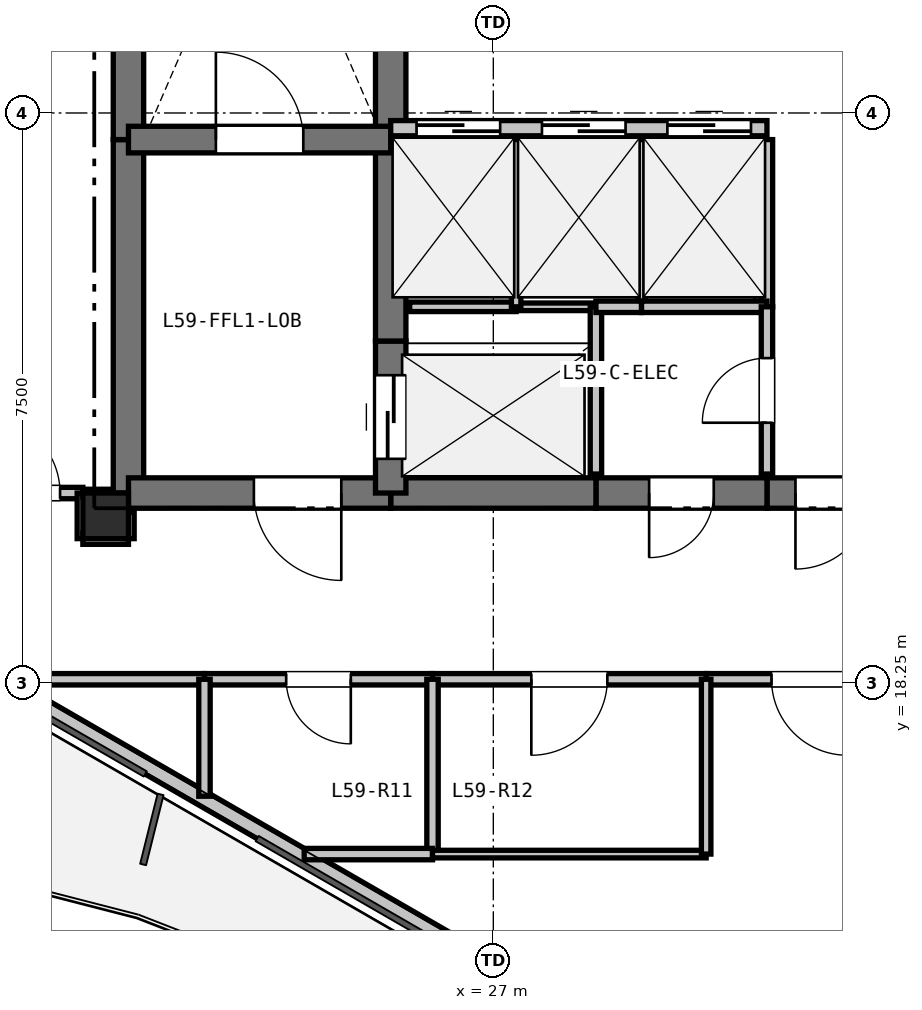
"""IFC4 building model, lengths in metres.
Left out: names, types, materials, properties, quantities, classifications, styles, units other than length and angle.
Written with IfcOpenShell. Run it as: python <this file> out.ifc"""

import sys

from ifc_helpers import new_model, si_unit, direction, frame, frame_2d, origin, origin_2d, place, context, subcontext, project, spatial, rectangle, extrude, element, fill, save


model = new_model("IFC4")
c1 = context("Model", 3, precision=1e-05, world=origin(), true_north=direction((0.0, 1.0)))
c2 = subcontext(c1, "Body", "Model", "MODEL_VIEW")
j1 = project(units=[si_unit("LENGTHUNIT", "METRE"), si_unit("PLANEANGLEUNIT", "RADIAN")], contexts=[c1])
p1 = place(None, origin())
s1 = spatial("IfcSite", under=j1, at=p1, CompositionType="ELEMENT")
p2 = place(p1, origin())
s2 = spatial("IfcBuilding", under=s1, at=p2, CompositionType="ELEMENT")
p3 = place(p2, frame((0.0, 0.0, 211.8)))
s3 = spatial("IfcBuildingStorey", under=s2, at=p3, CompositionType="ELEMENT", Elevation=211.8)
p4 = place(p3, frame((21.9, 20.45, 0.0), z_axis=(0.0, 0.0, 1.0), x_axis=(1.0, 0.0, 0.0)))
e1 = element("IfcColumn", 1, at=p4, inside=s3, PredefinedType="COLUMN", context=c2, shape_type="SweptSolid", body=[
    extrude(rectangle(XDim=0.6, YDim=0.6, at=origin_2d()), origin(), (0.0, 0.0, 1.0), 3.3),
])
p5 = place(p3, frame((27.102, 14.464, 0.0), z_axis=(0.0, 0.0, 1.0), x_axis=(-0.866020680503, 0.500008180874, 0.0)))
e2 = element("IfcWall", 2, at=p5, inside=s3, PredefinedType="PARAPET", context=c2, shape_type="SweptSolid", body=[
    extrude(rectangle(XDim=8.999, YDim=0.2, at=frame_2d((4.5, 0.0))), origin(), (0.0, 0.0, 1.0), 0.2),
])
p6 = place(p3, frame((22.2, 20.75, 0.0), z_axis=(0.0, 0.0, 1.0), x_axis=(0.0, 1.0, 0.0)))
e3 = element("IfcWall", 3, at=p6, inside=s3, PredefinedType="SHEAR", context=c2, shape_type="SweptSolid", body=[
    extrude(rectangle(XDim=4.65, YDim=0.4, at=frame_2d((2.325, 0.0))), origin(), (0.0, 0.0, 1.0), 3.07),
])
p7 = place(p3, frame((22.2, 25.4, 0.0), z_axis=(0.0, 0.0, 1.0), x_axis=(0.0, 1.0, 0.0)))
e4 = element("IfcWall", 4, at=p7, inside=s3, PredefinedType="SHEAR", context=c2, shape_type="SweptSolid", body=[
    extrude(rectangle(XDim=7.35, YDim=0.4, at=frame_2d((3.675, 0.0))), origin(), (0.0, 0.0, 1.0), 3.07),
])
p8 = place(p3, frame((32.35, 20.75, 0.0), z_axis=(0.0, 0.0, 1.0), x_axis=(-1.0, 0.0, 0.0)))
e5 = element("IfcWall", 5, at=p8, inside=s3, PredefinedType="SHEAR", context=c2, shape_type="SweptSolid", body=[
    extrude(rectangle(XDim=1.75, YDim=0.4, at=frame_2d((0.875, 0.0))), origin(), (0.0, 0.0, 1.0), 3.07),
])
p9 = place(p8, frame((0.375, 0.0, 0.0)))
e6 = element("IfcOpeningElement", 6, at=p9, cuts=e5, PredefinedType="OPENING", context=c2, shape_type="SweptSolid", body=[
    extrude(rectangle(XDim=1.0, YDim=2.15, at=frame_2d((0.5, 1.075))), frame((0.0, 0.21, 0.0), z_axis=(0.0, -1.0, 0.0), x_axis=(1.0, 0.0, 0.0)), (0.0, 0.0, 1.0), 0.42),
])
p10 = place(p3, frame((30.6, 20.75, 0.0), z_axis=(0.0, 0.0, 1.0), x_axis=(-1.0, 0.0, 0.0)))
e7 = element("IfcWall", 7, at=p10, inside=s3, PredefinedType="SHEAR", context=c2, shape_type="SweptSolid", body=[
    extrude(rectangle(XDim=2.25, YDim=0.4, at=frame_2d((1.125, 0.0))), origin(), (0.0, 0.0, 1.0), 3.07),
])
p11 = place(p10, frame((0.7, 0.0, 0.0)))
e8 = element("IfcOpeningElement", 8, at=p11, cuts=e7, PredefinedType="OPENING", context=c2, shape_type="SweptSolid", body=[
    extrude(rectangle(XDim=0.85, YDim=2.1, at=frame_2d((0.425, 1.05))), frame((0.0, 0.21, 0.0), z_axis=(0.0, -1.0, 0.0), x_axis=(1.0, 0.0, 0.0)), (0.0, 0.0, 1.0), 0.42),
])
p12 = place(p3, frame((28.35, 20.75, 0.0), z_axis=(0.0, 0.0, 1.0), x_axis=(-1.0, 0.0, 0.0)))
e9 = element("IfcWall", 9, at=p12, inside=s3, PredefinedType="SHEAR", context=c2, shape_type="SweptSolid", body=[
    extrude(rectangle(XDim=2.7, YDim=0.4, at=frame_2d((1.35, 0.0))), origin(), (0.0, 0.0, 1.0), 3.07),
])
p13 = place(p3, frame((25.65, 20.75, 0.0), z_axis=(0.0, 0.0, 1.0), x_axis=(-1.0, 0.0, 0.0)))
e10 = element("IfcWall", 10, at=p13, inside=s3, PredefinedType="SHEAR", context=c2, shape_type="SweptSolid", body=[
    extrude(rectangle(XDim=3.45, YDim=0.4, at=frame_2d((1.725, 0.0))), origin(), (0.0, 0.0, 1.0), 3.07),
])
p14 = place(p13, frame((0.65, 0.0, 0.0)))
e11 = element("IfcOpeningElement", 11, at=p14, cuts=e10, PredefinedType="OPENING", context=c2, shape_type="SweptSolid", body=[
    extrude(rectangle(XDim=1.15, YDim=2.15, at=frame_2d((0.575, 1.075))), frame((0.0, 0.21, 0.0), z_axis=(0.0, -1.0, 0.0), x_axis=(1.0, 0.0, 0.0)), (0.0, 0.0, 1.0), 0.42),
])
p15 = place(p3, frame((25.65, 20.75, 0.0), z_axis=(0.0, 0.0, 1.0), x_axis=(0.0, 1.0, 0.0)))
e12 = element("IfcWall", 12, at=p15, inside=s3, PredefinedType="SHEAR", context=c2, shape_type="SweptSolid", body=[
    extrude(rectangle(XDim=2.0, YDim=0.4, at=frame_2d((1.0, 0.0))), origin(), (0.0, 0.0, 1.0), 3.07),
])
p16 = place(p15, frame((0.45, 0.0, 0.0)))
e13 = element("IfcOpeningElement", 13, at=p16, cuts=e12, PredefinedType="OPENING", context=c2, shape_type="SweptSolid", body=[
    extrude(rectangle(XDim=1.1, YDim=2.15, at=frame_2d((0.55, 1.075))), frame((0.0, 0.21, 0.0), z_axis=(0.0, -1.0, 0.0), x_axis=(1.0, 0.0, 0.0)), (0.0, 0.0, 1.0), 0.42),
])
p17 = place(p3, frame((25.65, 22.75, 0.0), z_axis=(0.0, 0.0, 1.0), x_axis=(0.0, 1.0, 0.0)))
e14 = element("IfcWall", 14, at=p17, inside=s3, PredefinedType="SHEAR", context=c2, shape_type="SweptSolid", body=[
    extrude(rectangle(XDim=2.8, YDim=0.4, at=frame_2d((1.4, 0.0))), origin(), (0.0, 0.0, 1.0), 3.07),
])
p18 = place(p3, frame((25.65, 25.55, 0.0), z_axis=(0.0, 0.0, 1.0), x_axis=(0.0, 1.0, 0.0)))
e15 = element("IfcWall", 15, at=p18, inside=s3, PredefinedType="SHEAR", context=c2, shape_type="SweptSolid", body=[
    extrude(rectangle(XDim=2.4, YDim=0.4, at=frame_2d((1.2, 0.0))), origin(), (0.0, 0.0, 1.0), 3.07),
])
p19 = place(p3, frame((22.2, 25.4, 0.0), z_axis=(0.0, 0.0, 1.0), x_axis=(1.0, 0.0, 0.0)))
e16 = element("IfcWall", 16, at=p19, inside=s3, PredefinedType="SHEAR", context=c2, shape_type="SweptSolid", body=[
    extrude(rectangle(XDim=3.45, YDim=0.35, at=frame_2d((1.725, 0.0))), origin(), (0.0, 0.0, 1.0), 3.07),
])
p20 = place(p19, frame((1.15, 0.0, 0.0)))
e17 = element("IfcOpeningElement", 17, at=p20, cuts=e16, PredefinedType="OPENING", context=c2, shape_type="SweptSolid", body=[
    extrude(rectangle(XDim=1.15, YDim=2.15, at=frame_2d((0.575, 1.075))), frame((0.0, 0.185, 0.0), z_axis=(0.0, -1.0, 0.0), x_axis=(1.0, 0.0, 0.0)), (0.0, 0.0, 1.0), 0.37),
])
p21 = place(p3, frame((25.65, 25.55, 0.0), z_axis=(0.0, 0.0, 1.0), x_axis=(1.0, 0.0, 0.0)))
e18 = element("IfcWall", 18, at=p21, inside=s3, PredefinedType="PARTITIONING", context=c2, shape_type="SweptSolid", body=[
    extrude(rectangle(XDim=4.95, YDim=0.2, at=frame_2d((2.475, 0.0))), origin(), (0.0, 0.0, 1.0), 3.07),
])
p22 = place(p21, frame((0.34, 0.0, 0.0)))
e19 = element("IfcOpeningElement", 19, at=p22, cuts=e18, PredefinedType="OPENING", context=c2, shape_type="SweptSolid", body=[
    extrude(rectangle(XDim=1.1, YDim=2.15, at=frame_2d((0.55, 1.075))), frame((0.0, 0.11, 0.0), z_axis=(0.0, -1.0, 0.0), x_axis=(1.0, 0.0, 0.0)), (0.0, 0.0, 1.0), 0.22),
])
p23 = place(p21, frame((1.99, 0.0, 0.0)))
e20 = element("IfcOpeningElement", 20, at=p23, cuts=e18, PredefinedType="OPENING", context=c2, shape_type="SweptSolid", body=[
    extrude(rectangle(XDim=1.1, YDim=2.15, at=frame_2d((0.55, 1.075))), frame((0.0, 0.11, 0.0), z_axis=(0.0, -1.0, 0.0), x_axis=(1.0, 0.0, 0.0)), (0.0, 0.0, 1.0), 0.22),
])
p24 = place(p21, frame((3.64, 0.0, 0.0)))
e21 = element("IfcOpeningElement", 21, at=p24, cuts=e18, PredefinedType="OPENING", context=c2, shape_type="SweptSolid", body=[
    extrude(rectangle(XDim=1.1, YDim=2.15, at=frame_2d((0.55, 1.075))), frame((0.0, 0.11, 0.0), z_axis=(0.0, -1.0, 0.0), x_axis=(1.0, 0.0, 0.0)), (0.0, 0.0, 1.0), 0.22),
])
p25 = place(p3, frame((25.9, 23.2, 0.0), z_axis=(0.0, 0.0, 1.0), x_axis=(1.0, 0.0, 0.0)))
e22 = element("IfcWall", 22, at=p25, inside=s3, PredefinedType="PARTITIONING", context=c2, shape_type="SweptSolid", body=[
    extrude(rectangle(XDim=1.4, YDim=0.125, at=frame_2d((0.7, 0.0))), origin(), (0.0, 0.0, 1.0), 3.07),
])
p26 = place(p3, frame((27.3, 23.2, 0.0), z_axis=(0.0, 0.0, 1.0), x_axis=(1.0, 0.0, 0.0)))
e23 = element("IfcWall", 23, at=p26, inside=s3, PredefinedType="PARTITIONING", context=c2, shape_type="SweptSolid", body=[
    extrude(rectangle(XDim=1.05, YDim=0.1, at=frame_2d((0.525, 0.0))), origin(), (0.0, 0.0, 1.0), 3.07),
])
p27 = place(p3, frame((28.35, 23.2, 0.0), z_axis=(0.0, 0.0, 1.0), x_axis=(0.0, -1.0, 0.0)))
e24 = element("IfcWall", 24, at=p27, inside=s3, PredefinedType="PARTITIONING", context=c2, shape_type="SweptSolid", body=[
    extrude(rectangle(XDim=2.2, YDim=0.15, at=frame_2d((1.1, 0.0))), origin(), (0.0, 0.0, 1.0), 3.07),
])
p28 = place(p3, frame((27.3, 25.4, 0.0), z_axis=(0.0, 0.0, 1.0), x_axis=(0.0, -1.0, 0.0)))
e25 = element("IfcWall", 25, at=p28, inside=s3, PredefinedType="PARTITIONING", context=c2, shape_type="SweptSolid", body=[
    extrude(rectangle(XDim=2.2, YDim=0.125, at=frame_2d((1.1, 0.0))), origin(), (0.0, 0.0, 1.0), 3.07),
])
p29 = place(p3, frame((28.95, 25.4, 0.0), z_axis=(0.0, 0.0, 1.0), x_axis=(0.0, -1.0, 0.0)))
e26 = element("IfcWall", 26, at=p29, inside=s3, PredefinedType="PARTITIONING", context=c2, shape_type="SweptSolid", body=[
    extrude(rectangle(XDim=2.2, YDim=0.1, at=frame_2d((1.1, 0.0))), origin(), (0.0, 0.0, 1.0), 3.07),
])
p30 = place(p3, frame((28.95, 23.2, 0.0), z_axis=(0.0, 0.0, 1.0), x_axis=(-1.0, 0.0, 0.0)))
e27 = element("IfcWall", 27, at=p30, inside=s3, PredefinedType="PARTITIONING", context=c2, shape_type="SweptSolid", body=[
    extrude(rectangle(XDim=0.6, YDim=0.15, at=frame_2d((0.3, 0.0))), origin(), (0.0, 0.0, 1.0), 3.07),
])
p31 = place(p3, frame((30.6, 25.4, 0.0), z_axis=(0.0, 0.0, 1.0), x_axis=(0.0, -1.0, 0.0)))
e28 = element("IfcWall", 28, at=p31, inside=s3, PredefinedType="PARTITIONING", context=c2, shape_type="SweptSolid", body=[
    extrude(rectangle(XDim=2.2, YDim=0.15, at=frame_2d((1.1, 0.0))), origin(), (0.0, 0.0, 1.0), 3.07),
])
p32 = place(p3, frame((30.6, 23.2, 0.0), z_axis=(0.0, 0.0, 1.0), x_axis=(-1.0, 0.0, 0.0)))
e29 = element("IfcWall", 29, at=p32, inside=s3, PredefinedType="PARTITIONING", context=c2, shape_type="SweptSolid", body=[
    extrude(rectangle(XDim=1.65, YDim=0.15, at=frame_2d((0.825, 0.0))), origin(), (0.0, 0.0, 1.0), 3.07),
])
p33 = place(p3, frame((30.6, 21.0, 0.0), z_axis=(0.0, 0.0, 1.0), x_axis=(0.0, 1.0, 0.0)))
e30 = element("IfcWall", 30, at=p33, inside=s3, PredefinedType="PARTITIONING", context=c2, shape_type="SweptSolid", body=[
    extrude(rectangle(XDim=2.2, YDim=0.15, at=frame_2d((1.1, 0.0))), origin(), (0.0, 0.0, 1.0), 3.07),
])
p34 = place(p33, frame((0.675, 0.0, 0.0)))
e31 = element("IfcOpeningElement", 31, at=p34, cuts=e30, PredefinedType="OPENING", context=c2, shape_type="SweptSolid", body=[
    extrude(rectangle(XDim=0.85, YDim=2.1, at=frame_2d((0.425, 1.05))), frame((0.0, 0.085, 0.0), z_axis=(0.0, -1.0, 0.0), x_axis=(1.0, 0.0, 0.0)), (0.0, 0.0, 1.0), 0.17),
])
p35 = place(p3, frame((20.0, 20.75, 0.0), z_axis=(0.0, 0.0, 1.0), x_axis=(1.0, 0.0, 0.0)))
e32 = element("IfcWall", 32, at=p35, inside=s3, PredefinedType="PARTITIONING", context=c2, shape_type="SweptSolid", body=[
    extrude(rectangle(XDim=1.6, YDim=0.15, at=frame_2d((0.8, 0.0))), origin(), (0.0, 0.0, 1.0), 2.518),
])
p36 = place(p35, frame((0.3, 0.0, 0.0)))
e33 = element("IfcOpeningElement", 33, at=p36, cuts=e32, PredefinedType="OPENING", context=c2, shape_type="SweptSolid", body=[
    extrude(rectangle(XDim=1.0, YDim=2.15, at=frame_2d((0.5, 1.075))), frame((0.0, 0.085, 0.0), z_axis=(0.0, -1.0, 0.0), x_axis=(1.0, 0.0, 0.0)), (0.0, 0.0, 1.0), 0.17),
])
p37 = place(p3, frame((21.6, 20.75, 0.0), z_axis=(0.0, 0.0, 1.0), x_axis=(0.0, -1.0, 0.0)))
e34 = element("IfcWall", 34, at=p37, inside=s3, PredefinedType="PARTITIONING", context=c2, shape_type="SweptSolid", body=[
    extrude(rectangle(XDim=0.6, YDim=0.15, at=frame_2d((0.3, 0.0))), origin(), (0.0, 0.0, 1.0), 2.518),
])
p38 = place(p3, frame((21.6, 20.15, 0.0), z_axis=(0.0, 0.0, 1.0), x_axis=(1.0, 0.0, 0.0)))
e35 = element("IfcWall", 35, at=p38, inside=s3, PredefinedType="PARTITIONING", context=c2, shape_type="SweptSolid", body=[
    extrude(rectangle(XDim=0.6, YDim=0.15, at=frame_2d((0.3, 0.0))), origin(), (0.0, 0.0, 1.0), 2.518),
])
p39 = place(p3, frame((22.2, 20.15, 0.0), z_axis=(0.0, 0.0, 1.0), x_axis=(0.0, 1.0, 0.0)))
e36 = element("IfcWall", 36, at=p39, inside=s3, PredefinedType="PARTITIONING", context=c2, shape_type="SweptSolid", body=[
    extrude(rectangle(XDim=0.35, YDim=0.15, at=frame_2d((0.175, 0.0))), origin(), (0.0, 0.0, 1.0), 2.518),
])
p40 = place(p3, frame((32.52, 18.3, 0.0), z_axis=(0.0, 0.0, 1.0), x_axis=(-1.0, 0.0, 0.0)))
e37 = element("IfcWall", 37, at=p40, inside=s3, PredefinedType="PARTITIONING", context=c2, shape_type="SweptSolid", body=[
    extrude(rectangle(XDim=2.72, YDim=0.15, at=frame_2d((1.36, 0.0))), origin(), (0.0, 0.0, 1.0), 3.07),
])
p41 = place(p40, frame((0.86, 0.0, 0.0)))
e38 = element("IfcOpeningElement", 38, at=p41, cuts=e37, PredefinedType="OPENING", context=c2, shape_type="SweptSolid", body=[
    extrude(rectangle(XDim=1.0, YDim=2.15, at=frame_2d((0.5, 1.075))), frame((0.0, 0.085, 0.0), z_axis=(0.0, -1.0, 0.0), x_axis=(1.0, 0.0, 0.0)), (0.0, 0.0, 1.0), 0.17),
])
p42 = place(p3, frame((29.8, 18.3, 0.0), z_axis=(0.0, 0.0, 1.0), x_axis=(-1.0, 0.0, 0.0)))
e39 = element("IfcWall", 39, at=p42, inside=s3, PredefinedType="PARTITIONING", context=c2, shape_type="SweptSolid", body=[
    extrude(rectangle(XDim=3.6, YDim=0.15, at=frame_2d((1.8, 0.0))), origin(), (0.0, 0.0, 1.0), 3.07),
])
p43 = place(p42, frame((1.3, 0.0, 0.0)))
e40 = element("IfcOpeningElement", 40, at=p43, cuts=e39, PredefinedType="OPENING", context=c2, shape_type="SweptSolid", body=[
    extrude(rectangle(XDim=1.0, YDim=2.15, at=frame_2d((0.5, 1.075))), frame((0.0, 0.085, 0.0), z_axis=(0.0, -1.0, 0.0), x_axis=(1.0, 0.0, 0.0)), (0.0, 0.0, 1.0), 0.17),
])
p44 = place(p3, frame((26.2, 18.3, 0.0), z_axis=(0.0, 0.0, 1.0), x_axis=(-1.0, 0.0, 0.0)))
e41 = element("IfcWall", 41, at=p44, inside=s3, PredefinedType="PARTITIONING", context=c2, shape_type="SweptSolid", body=[
    extrude(rectangle(XDim=3.0, YDim=0.15, at=frame_2d((1.5, 0.0))), origin(), (0.0, 0.0, 1.0), 2.518),
])
p45 = place(p44, frame((1.075, 0.0, 0.0)))
e42 = element("IfcOpeningElement", 42, at=p45, cuts=e41, PredefinedType="OPENING", context=c2, shape_type="SweptSolid", body=[
    extrude(rectangle(XDim=0.85, YDim=2.1, at=frame_2d((0.425, 1.05))), frame((0.0, 0.085, 0.0), z_axis=(0.0, -1.0, 0.0), x_axis=(1.0, 0.0, 0.0)), (0.0, 0.0, 1.0), 0.17),
])
p46 = place(p3, frame((23.2, 18.3, 0.0), z_axis=(0.0, 0.0, 1.0), x_axis=(-1.0, 0.0, 0.0)))
e43 = element("IfcWall", 43, at=p46, inside=s3, PredefinedType="PARTITIONING", context=c2, shape_type="SweptSolid", body=[
    extrude(rectangle(XDim=2.672, YDim=0.15, at=frame_2d((1.336, 0.0))), origin(), (0.0, 0.0, 1.0), 2.365),
])
p47 = place(p3, frame((21.95, 20.75, 0.0), z_axis=(0.0, 0.0, 1.0), x_axis=(-1.0, 0.0, 0.0)))
e44 = element("IfcWall", 44, at=p47, inside=s3, PredefinedType="PARTITIONING", context=c2, shape_type="SweptSolid", body=[
    extrude(rectangle(XDim=0.35, YDim=0.1, at=frame_2d((0.175, 0.0))), origin(), (0.0, 0.0, 1.0), 2.595),
])
p48 = place(p3, frame((26.2, 18.3, 0.0), z_axis=(0.0, 0.0, 1.0), x_axis=(0.0, -1.0, 0.0)))
e45 = element("IfcWall", 45, at=p48, inside=s3, PredefinedType="PARTITIONING", context=c2, shape_type="SweptSolid", body=[
    extrude(rectangle(XDim=2.3, YDim=0.15, at=frame_2d((1.15, 0.0))), origin(), (0.0, 0.0, 1.0), 2.518),
])
p49 = place(p3, frame((26.2, 16.0, 0.0), z_axis=(0.0, 0.0, 1.0), x_axis=(-1.0, 0.0, 0.0)))
e46 = element("IfcWall", 46, at=p49, inside=s3, PredefinedType="PARTITIONING", context=c2, shape_type="SweptSolid", body=[
    extrude(rectangle(XDim=1.688, YDim=0.15, at=frame_2d((0.844, 0.0))), origin(), (0.0, 0.0, 1.0), 2.365),
])
p50 = place(p3, frame((23.2, 16.761, 0.0), z_axis=(0.0, 0.0, 1.0), x_axis=(0.0, 1.0, 0.0)))
e47 = element("IfcWall", 47, at=p50, inside=s3, PredefinedType="PARTITIONING", context=c2, shape_type="SweptSolid", body=[
    extrude(rectangle(XDim=1.539, YDim=0.15, at=frame_2d((0.769, 0.0))), origin(), (0.0, 0.0, 1.0), 2.365),
])
p51 = place(p3, frame((29.8, 16.0, 0.0), z_axis=(0.0, 0.0, 1.0), x_axis=(-1.0, 0.0, 0.0)))
e48 = element("IfcWall", 48, at=p51, inside=s3, PredefinedType="PARTITIONING", context=c2, shape_type="SweptSolid", body=[
    extrude(rectangle(XDim=3.6, YDim=0.1, at=frame_2d((1.8, 0.0))), origin(), (0.0, 0.0, 1.0), 2.518),
])
p52 = place(p3, frame((29.8, 18.3, 0.0), z_axis=(0.0, 0.0, 1.0), x_axis=(0.0, -1.0, 0.0)))
e49 = element("IfcWall", 49, at=p52, inside=s3, PredefinedType="PARTITIONING", context=c2, shape_type="SweptSolid", body=[
    extrude(rectangle(XDim=2.3, YDim=0.125, at=frame_2d((1.15, 0.0))), origin(), (0.0, 0.0, 1.0), 3.07),
])
p53 = place(p22, origin())
e50 = element("IfcDoor", 50, at=p53, inside=s3, OperationType="SLIDING_TO_LEFT", PredefinedType="DOOR", context=c2, shape_type="SweptSolid", body=[
    extrude(rectangle(XDim=1.1, YDim=2.15, at=frame_2d((0.55, 1.075))), frame((0.0, 0.025, 0.0), z_axis=(0.0, -1.0, 0.0), x_axis=(1.0, 0.0, 0.0)), (0.0, 0.0, 1.0), 0.05),
])
fill(e19, e50)
p54 = place(p23, origin())
e51 = element("IfcDoor", 51, at=p54, inside=s3, OperationType="SLIDING_TO_LEFT", PredefinedType="DOOR", context=c2, shape_type="SweptSolid", body=[
    extrude(rectangle(XDim=1.1, YDim=2.15, at=frame_2d((0.55, 1.075))), frame((0.0, 0.025, 0.0), z_axis=(0.0, -1.0, 0.0), x_axis=(1.0, 0.0, 0.0)), (0.0, 0.0, 1.0), 0.05),
])
fill(e20, e51)
p55 = place(p24, origin())
e52 = element("IfcDoor", 52, at=p55, inside=s3, OperationType="SLIDING_TO_LEFT", PredefinedType="DOOR", context=c2, shape_type="SweptSolid", body=[
    extrude(rectangle(XDim=1.1, YDim=2.15, at=frame_2d((0.55, 1.075))), frame((0.0, 0.025, 0.0), z_axis=(0.0, -1.0, 0.0), x_axis=(1.0, 0.0, 0.0)), (0.0, 0.0, 1.0), 0.05),
])
fill(e21, e52)
p56 = place(p9, origin())
e53 = element("IfcDoor", 53, at=p56, inside=s3, OperationType="SINGLE_SWING_RIGHT", PredefinedType="DOOR", context=c2, shape_type="SweptSolid", body=[
    extrude(rectangle(XDim=1.0, YDim=2.15, at=frame_2d((0.5, 1.075))), frame((0.0, 0.025, 0.0), z_axis=(0.0, -1.0, 0.0), x_axis=(1.0, 0.0, 0.0)), (0.0, 0.0, 1.0), 0.05),
])
fill(e6, e53)
p57 = place(p16, origin())
e54 = element("IfcDoor", 54, at=p57, inside=s3, OperationType="SLIDING_TO_LEFT", PredefinedType="DOOR", context=c2, shape_type="SweptSolid", body=[
    extrude(rectangle(XDim=1.1, YDim=2.15, at=frame_2d((0.55, 1.075))), frame((0.0, 0.025, 0.0), z_axis=(0.0, -1.0, 0.0), x_axis=(1.0, 0.0, 0.0)), (0.0, 0.0, 1.0), 0.05),
])
fill(e13, e54)
p58 = place(p20, origin())
e55 = element("IfcDoor", 55, at=p58, inside=s3, OperationType="SINGLE_SWING_LEFT", PredefinedType="DOOR", context=c2, shape_type="SweptSolid", body=[
    extrude(rectangle(XDim=1.15, YDim=2.15, at=frame_2d((0.575, 1.075))), frame((0.0, 0.025, 0.0), z_axis=(0.0, -1.0, 0.0), x_axis=(1.0, 0.0, 0.0)), (0.0, 0.0, 1.0), 0.05),
])
fill(e17, e55)
p59 = place(p14, origin())
e56 = element("IfcDoor", 56, at=p59, inside=s3, OperationType="SINGLE_SWING_LEFT", PredefinedType="DOOR", context=c2, shape_type="SweptSolid", body=[
    extrude(rectangle(XDim=1.15, YDim=2.15, at=frame_2d((0.575, 1.075))), frame((0.0, 0.025, 0.0), z_axis=(0.0, -1.0, 0.0), x_axis=(1.0, 0.0, 0.0)), (0.0, 0.0, 1.0), 0.05),
])
fill(e11, e56)
p60 = place(p34, origin())
e57 = element("IfcDoor", 57, at=p60, inside=s3, OperationType="SINGLE_SWING_LEFT", PredefinedType="DOOR", context=c2, shape_type="SweptSolid", body=[
    extrude(rectangle(XDim=0.85, YDim=2.1, at=frame_2d((0.425, 1.05))), frame((0.0, 0.025, 0.0), z_axis=(0.0, -1.0, 0.0), x_axis=(1.0, 0.0, 0.0)), (0.0, 0.0, 1.0), 0.05),
])
fill(e31, e57)
p61 = place(p11, origin())
e58 = element("IfcDoor", 58, at=p61, inside=s3, OperationType="SINGLE_SWING_RIGHT", PredefinedType="DOOR", context=c2, shape_type="SweptSolid", body=[
    extrude(rectangle(XDim=0.85, YDim=2.1, at=frame_2d((0.425, 1.05))), frame((0.0, 0.025, 0.0), z_axis=(0.0, -1.0, 0.0), x_axis=(1.0, 0.0, 0.0)), (0.0, 0.0, 1.0), 0.05),
])
fill(e8, e58)
p62 = place(p36, origin())
e59 = element("IfcDoor", 59, at=p62, inside=s3, OperationType="SINGLE_SWING_LEFT", PredefinedType="DOOR", context=c2, shape_type="SweptSolid", body=[
    extrude(rectangle(XDim=1.0, YDim=2.15, at=frame_2d((0.5, 1.075))), frame((0.0, 0.025, 0.0), z_axis=(0.0, -1.0, 0.0), x_axis=(1.0, 0.0, 0.0)), (0.0, 0.0, 1.0), 0.05),
])
fill(e33, e59)
p63 = place(p45, origin())
e60 = element("IfcDoor", 60, at=p63, inside=s3, OperationType="SINGLE_SWING_LEFT", PredefinedType="DOOR", context=c2, shape_type="SweptSolid", body=[
    extrude(rectangle(XDim=0.85, YDim=2.1, at=frame_2d((0.425, 1.05))), frame((0.0, 0.025, 0.0), z_axis=(0.0, -1.0, 0.0), x_axis=(1.0, 0.0, 0.0)), (0.0, 0.0, 1.0), 0.05),
])
fill(e42, e60)
p64 = place(p43, origin())
e61 = element("IfcDoor", 61, at=p64, inside=s3, OperationType="SINGLE_SWING_RIGHT", PredefinedType="DOOR", context=c2, shape_type="SweptSolid", body=[
    extrude(rectangle(XDim=1.0, YDim=2.15, at=frame_2d((0.5, 1.075))), frame((0.0, 0.025, 0.0), z_axis=(0.0, -1.0, 0.0), x_axis=(1.0, 0.0, 0.0)), (0.0, 0.0, 1.0), 0.05),
])
fill(e40, e61)
p65 = place(p41, origin())
e62 = element("IfcDoor", 62, at=p65, inside=s3, OperationType="SINGLE_SWING_LEFT", PredefinedType="DOOR", context=c2, shape_type="SweptSolid", body=[
    extrude(rectangle(XDim=1.0, YDim=2.15, at=frame_2d((0.5, 1.075))), frame((0.0, 0.025, 0.0), z_axis=(0.0, -1.0, 0.0), x_axis=(1.0, 0.0, 0.0)), (0.0, 0.0, 1.0), 0.05),
])
fill(e38, e62)
save(model, sys.argv[1])
